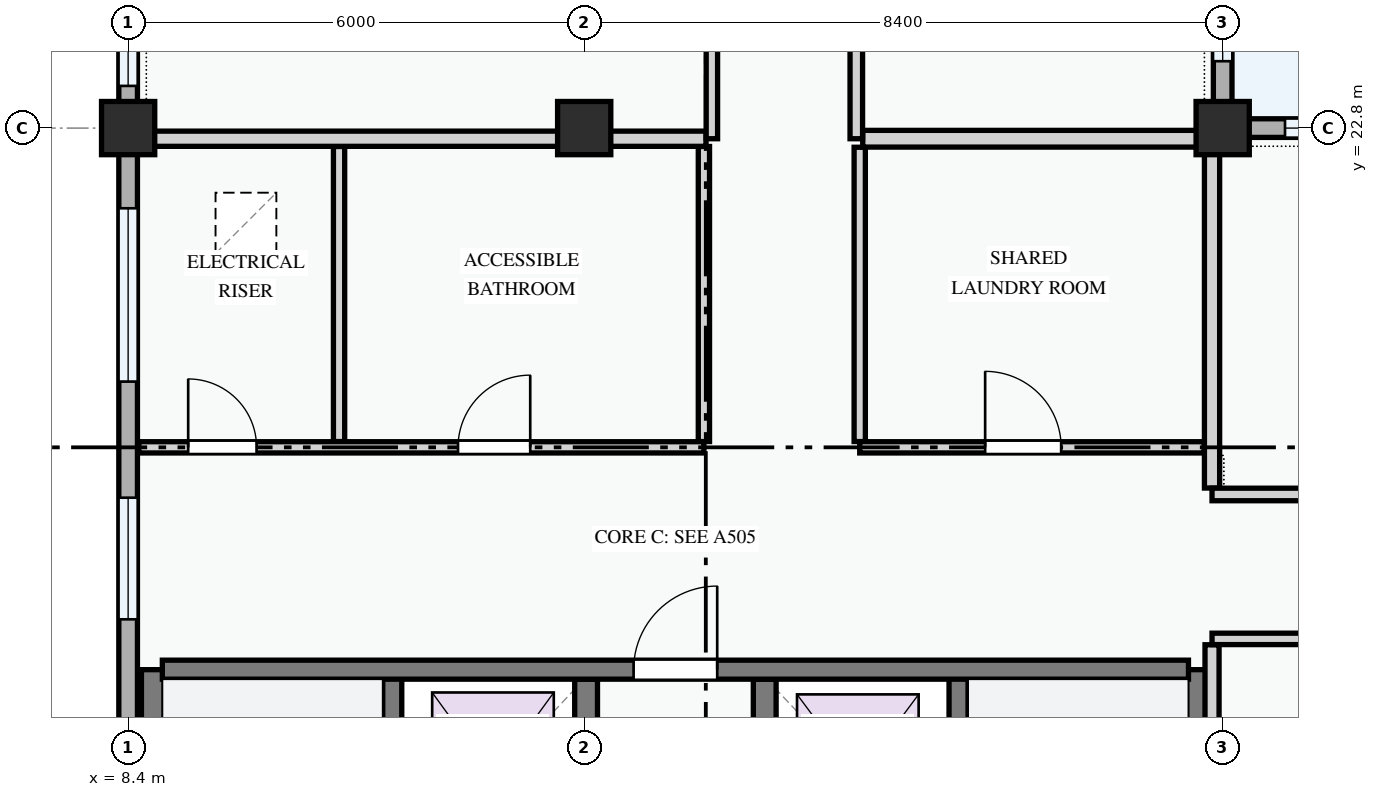
"""IFC4 building model, lengths in metres.
Left out: names, types, materials, properties, quantities, classifications, styles, units other than length and angle.
Written with IfcOpenShell. Run it as: python <this file> out.ifc"""

import sys

from ifc_helpers import new_model, si_unit, direction, frame, frame_2d, origin, origin_2d, place, context, subcontext, project, spatial, rectangle, extrude, element, fill, save


model = new_model("IFC4")
c1 = context("Model", 3, precision=1e-05, world=origin(), true_north=direction((0.0, 1.0)))
c2 = subcontext(c1, "Body", "Model", "MODEL_VIEW")
j1 = project(units=[si_unit("LENGTHUNIT", "METRE"), si_unit("PLANEANGLEUNIT", "RADIAN")], contexts=[c1])
p1 = place(None, origin())
s1 = spatial("IfcSite", under=j1, at=p1, CompositionType="ELEMENT")
p2 = place(p1, origin())
s2 = spatial("IfcBuilding", under=s1, at=p2, CompositionType="ELEMENT")
p3 = place(p2, origin())
s3 = spatial("IfcBuildingStorey", under=s2, at=p3, CompositionType="ELEMENT", Elevation=0.0)
for number, where, z_axis, x_axis in (
    (1, (8.4, 22.8, 0.0), (0.0, 0.0, 1.0), (1.0, 0.0, 0.0)),
    (2, (14.4, 22.8, 0.0), (0.0, 0.0, 1.0), (1.0, 0.0, 0.0)),
    (3, (22.8, 22.8, 0.0), (0.0, 0.0, 1.0), (1.0, 0.0, 0.0)),
):
    element("IfcColumn", number, at=place(p3, frame(where, z_axis=z_axis, x_axis=x_axis)), inside=s3, PredefinedType="COLUMN", context=c2, shape_type="SweptSolid", body=[
        extrude(rectangle(XDim=0.7, YDim=0.7, at=origin_2d()), origin(), (0.0, 0.0, 1.0), 4.5),
    ])
p4 = place(p3, frame((22.8, 22.8, 0.0), z_axis=(0.0, 0.0, 1.0), x_axis=(0.0, 1.0, 0.0)))
e4 = element("IfcWall", 4, at=p4, inside=s3, PredefinedType="STANDARD", context=c2, shape_type="SweptSolid", body=[
    extrude(rectangle(XDim=6.0, YDim=0.245, at=frame_2d((3.0, 0.0))), origin(), (0.0, 0.0, 1.0), 3.585),
])
p5 = place(p4, frame((0.88, 0.0, 0.78)))
e5 = element("IfcOpeningElement", 5, at=p5, cuts=e4, PredefinedType="OPENING", context=c2, shape_type="SweptSolid", body=[
    extrude(rectangle(XDim=1.5, YDim=1.5, at=frame_2d((0.75, 0.75))), frame((0.0, 0.133, 0.0), z_axis=(0.0, -1.0, 0.0), x_axis=(1.0, 0.0, 0.0)), (0.0, 0.0, 1.0), 0.265),
])
p6 = place(p4, frame((3.495, 0.0, 0.78)))
e6 = element("IfcOpeningElement", 6, at=p6, cuts=e4, PredefinedType="OPENING", context=c2, shape_type="SweptSolid", body=[
    extrude(rectangle(XDim=1.75, YDim=1.45, at=frame_2d((0.875, 0.725))), frame((0.0, 0.133, 0.0), z_axis=(0.0, -1.0, 0.0), x_axis=(1.0, 0.0, 0.0)), (0.0, 0.0, 1.0), 0.265),
])
p7 = place(p3, frame((8.4, 28.8, 0.0), z_axis=(0.0, 0.0, 1.0), x_axis=(0.0, -1.0, 0.0)))
e7 = element("IfcWall", 7, at=p7, inside=s3, PredefinedType="STANDARD", context=c2, shape_type="SweptSolid", body=[
    extrude(rectangle(XDim=6.0, YDim=0.245, at=frame_2d((3.0, 0.0))), origin(), (0.0, 0.0, 1.0), 3.585),
])
p8 = place(p7, frame((0.68, 0.0, 0.78)))
e8 = element("IfcOpeningElement", 8, at=p8, cuts=e7, PredefinedType="OPENING", context=c2, shape_type="SweptSolid", body=[
    extrude(rectangle(XDim=1.9, YDim=1.55, at=frame_2d((0.95, 0.775))), frame((0.0, 0.133, 0.0), z_axis=(0.0, -1.0, 0.0), x_axis=(1.0, 0.0, 0.0)), (0.0, 0.0, 1.0), 0.265),
])
p9 = place(p7, frame((3.295, 0.0, 0.78)))
e9 = element("IfcOpeningElement", 9, at=p9, cuts=e7, PredefinedType="OPENING", context=c2, shape_type="SweptSolid", body=[
    extrude(rectangle(XDim=2.15, YDim=1.65, at=frame_2d((1.075, 0.825))), frame((0.0, 0.133, 0.0), z_axis=(0.0, -1.0, 0.0), x_axis=(1.0, 0.0, 0.0)), (0.0, 0.0, 1.0), 0.265),
])
p10 = place(p3, frame((8.4, 22.8, 0.0), z_axis=(0.0, 0.0, 1.0), x_axis=(0.0, -1.0, 0.0)))
e10 = element("IfcWall", 10, at=p10, inside=s3, PredefinedType="STANDARD", context=c2, shape_type="SweptSolid", body=[
    extrude(rectangle(XDim=8.4, YDim=0.245, at=frame_2d((4.2, 0.0))), origin(), (0.0, 0.0, 1.0), 3.485),
])
p11 = place(p10, frame((1.055, 0.0, 0.78)))
e11 = element("IfcOpeningElement", 11, at=p11, cuts=e10, PredefinedType="OPENING", context=c2, shape_type="SweptSolid", body=[
    extrude(rectangle(XDim=2.28, YDim=1.46, at=frame_2d((1.14, 0.73))), frame((0.0, 0.133, 0.0), z_axis=(0.0, -1.0, 0.0), x_axis=(1.0, 0.0, 0.0)), (0.0, 0.0, 1.0), 0.265),
])
p12 = place(p10, frame((4.863, 0.0, 0.78)))
e12 = element("IfcOpeningElement", 12, at=p12, cuts=e10, PredefinedType="OPENING", context=c2, shape_type="SweptSolid", body=[
    extrude(rectangle(XDim=1.6, YDim=1.55, at=frame_2d((0.8, 0.775))), frame((0.0, 0.133, 0.0), z_axis=(0.0, -1.0, 0.0), x_axis=(1.0, 0.0, 0.0)), (0.0, 0.0, 1.0), 0.265),
])
p13 = place(p3, frame((28.8, 22.8, 0.0), z_axis=(0.0, 0.0, 1.0), x_axis=(-1.0, 0.0, 0.0)))
e13 = element("IfcWall", 13, at=p13, inside=s3, PredefinedType="STANDARD", context=c2, shape_type="SweptSolid", body=[
    extrude(rectangle(XDim=6.0, YDim=0.245, at=frame_2d((3.0, 0.0))), origin(), (0.0, 0.0, 1.0), 3.585),
])
p14 = place(p13, frame((1.005, 0.0, 0.78)))
e14 = element("IfcOpeningElement", 14, at=p14, cuts=e13, PredefinedType="OPENING", context=c2, shape_type="SweptSolid", body=[
    extrude(rectangle(XDim=1.25, YDim=1.45, at=frame_2d((0.625, 0.725))), frame((0.0, 0.133, 0.0), z_axis=(0.0, -1.0, 0.0), x_axis=(1.0, 0.0, 0.0)), (0.0, 0.0, 1.0), 0.265),
])
p15 = place(p13, frame((3.56, 0.0, 0.78)))
e15 = element("IfcOpeningElement", 15, at=p15, cuts=e13, PredefinedType="OPENING", context=c2, shape_type="SweptSolid", body=[
    extrude(rectangle(XDim=1.62, YDim=1.38, at=frame_2d((0.81, 0.69))), frame((0.0, 0.133, 0.0), z_axis=(0.0, -1.0, 0.0), x_axis=(1.0, 0.0, 0.0)), (0.0, 0.0, 1.0), 0.265),
])
p16 = place(p3, frame((11.875, 8.75, 0.0), z_axis=(0.0, 0.0, 1.0), x_axis=(0.0, 1.0, 0.0)))
e16 = element("IfcWall", 16, at=p16, inside=s3, PredefinedType="SHEAR", context=c2, shape_type="SweptSolid", body=[
    extrude(rectangle(XDim=6.925, YDim=0.25, at=frame_2d((3.462, 0.0))), origin(), (0.0, 0.0, 1.0), 4.2),
])
p17 = place(p16, frame((0.35, 0.0, 0.0)))
e17 = element("IfcOpeningElement", 17, at=p17, cuts=e16, PredefinedType="OPENING", context=c2, shape_type="SweptSolid", body=[
    extrude(rectangle(XDim=0.95, YDim=2.1, at=frame_2d((0.475, 1.05))), frame((0.0, 0.135, 0.0), z_axis=(0.0, -1.0, 0.0), x_axis=(1.0, 0.0, 0.0)), (0.0, 0.0, 1.0), 0.27),
])
p18 = place(p3, frame((8.725, 8.6, 0.0), z_axis=(0.0, 0.0, 1.0), x_axis=(0.0, 1.0, 0.0)))
e18 = element("IfcWall", 18, at=p18, inside=s3, PredefinedType="SHEAR", context=c2, shape_type="SweptSolid", body=[
    extrude(rectangle(XDim=7.075, YDim=0.3, at=frame_2d((3.538, 0.0))), origin(), (0.0, 0.0, 1.0), 4.2),
])
p19 = place(p3, frame((22.475, 8.75, 0.0), z_axis=(0.0, 0.0, 1.0), x_axis=(0.0, 1.0, 0.0)))
e19 = element("IfcWall", 19, at=p19, inside=s3, PredefinedType="SHEAR", context=c2, shape_type="SweptSolid", body=[
    extrude(rectangle(XDim=6.925, YDim=0.3, at=frame_2d((3.462, 0.0))), origin(), (0.0, 0.0, 1.0), 4.2),
])
p20 = place(p3, frame((19.325, 8.75, 0.0), z_axis=(0.0, 0.0, 1.0), x_axis=(0.0, 1.0, 0.0)))
e20 = element("IfcWall", 20, at=p20, inside=s3, PredefinedType="SHEAR", context=c2, shape_type="SweptSolid", body=[
    extrude(rectangle(XDim=6.925, YDim=0.25, at=frame_2d((3.462, 0.0))), origin(), (0.0, 0.0, 1.0), 4.2),
])
p21 = place(p20, frame((0.35, 0.0, 0.0)))
e21 = element("IfcOpeningElement", 21, at=p21, cuts=e20, PredefinedType="OPENING", context=c2, shape_type="SweptSolid", body=[
    extrude(rectangle(XDim=0.95, YDim=2.1, at=frame_2d((0.475, 1.05))), frame((0.0, 0.135, 0.0), z_axis=(0.0, -1.0, 0.0), x_axis=(1.0, 0.0, 0.0)), (0.0, 0.0, 1.0), 0.27),
])
for number, where, z_axis, x_axis in (
    (22, (14.425, 13.125, 0.0), (0.0, 0.0, 1.0), (0.0, 1.0, 0.0)),
    (23, (16.775, 13.125, 0.0), (0.0, 0.0, 1.0), (0.0, 1.0, 0.0)),
):
    element("IfcWall", number, at=place(p3, frame(where, z_axis=z_axis, x_axis=x_axis)), inside=s3, PredefinedType="SHEAR", context=c2, shape_type="SweptSolid", body=[
        extrude(rectangle(XDim=2.425, YDim=0.3, at=frame_2d((1.212, 0.0))), origin(), (0.0, 0.0, 1.0), 4.2),
    ])
p22 = place(p3, frame((8.85, 15.675, 0.0), z_axis=(0.0, 0.0, 1.0), x_axis=(1.0, 0.0, 0.0)))
e24 = element("IfcWall", 24, at=p22, inside=s3, PredefinedType="SHEAR", context=c2, shape_type="SweptSolid", body=[
    extrude(rectangle(XDim=13.5, YDim=0.25, at=frame_2d((6.75, 0.0))), origin(), (0.0, 0.0, 1.0), 4.2),
])
p23 = place(p22, frame((6.2, 0.0, 0.0)))
e25 = element("IfcOpeningElement", 25, at=p23, cuts=e24, PredefinedType="OPENING", context=c2, shape_type="SweptSolid", body=[
    extrude(rectangle(XDim=1.1, YDim=2.15, at=frame_2d((0.55, 1.075))), frame((0.0, 0.135, 0.0), z_axis=(0.0, -1.0, 0.0), x_axis=(1.0, 0.0, 0.0)), (0.0, 0.0, 1.0), 0.27),
])
for number, where, z_axis, x_axis in (
    (26, (11.175, 18.676, 0.0), (0.0, 0.0, 1.0), (0.0, 1.0, 0.0)),
    (27, (15.975, 18.676, 0.0), (0.0, 0.0, 1.0), (0.0, 1.0, 0.0)),
):
    element("IfcWall", number, at=place(p3, frame(where, z_axis=z_axis, x_axis=x_axis)), inside=s3, PredefinedType="PARTITIONING", context=c2, shape_type="SweptSolid", body=[
        extrude(rectangle(XDim=3.882, YDim=0.148, at=frame_2d((1.941, 0.0))), origin(), (0.0, 0.0, 1.0), 4.2),
    ])
p24 = place(p3, frame((18.025, 18.676, 0.0), z_axis=(0.0, 0.0, 1.0), x_axis=(0.0, 1.0, 0.0)))
e28 = element("IfcWall", 28, at=p24, inside=s3, PredefinedType="PARTITIONING", context=c2, shape_type="SweptSolid", body=[
    extrude(rectangle(XDim=3.872, YDim=0.148, at=frame_2d((1.936, 0.0))), origin(), (0.0, 0.0, 1.0), 4.2),
])
p25 = place(p3, frame((8.54, 18.6, 0.0), z_axis=(0.0, 0.0, 1.0), x_axis=(1.0, 0.0, 0.0)))
e29 = element("IfcWall", 29, at=p25, inside=s3, PredefinedType="PARTITIONING", context=c2, shape_type="SweptSolid", body=[
    extrude(rectangle(XDim=7.435, YDim=0.148, at=frame_2d((3.718, 0.0))), origin(), (0.0, 0.0, 1.0), 4.2),
])
p26 = place(p25, frame((0.65, 0.0, 0.0)))
e30 = element("IfcOpeningElement", 30, at=p26, cuts=e29, PredefinedType="OPENING", context=c2, shape_type="SweptSolid", body=[
    extrude(rectangle(XDim=0.9, YDim=2.1, at=frame_2d((0.45, 1.05))), frame((0.0, 0.084, 0.0), z_axis=(0.0, -1.0, 0.0), x_axis=(1.0, 0.0, 0.0)), (0.0, 0.0, 1.0), 0.168),
])
p27 = place(p25, frame((4.2, 0.0, 0.0)))
e31 = element("IfcOpeningElement", 31, at=p27, cuts=e29, PredefinedType="OPENING", context=c2, shape_type="SweptSolid", body=[
    extrude(rectangle(XDim=0.95, YDim=2.1, at=frame_2d((0.475, 1.05))), frame((0.0, 0.084, 0.0), z_axis=(0.0, -1.0, 0.0), x_axis=(1.0, 0.0, 0.0)), (0.0, 0.0, 1.0), 0.168),
])
p28 = place(p3, frame((18.025, 18.6, 0.0), z_axis=(0.0, 0.0, 1.0), x_axis=(1.0, 0.0, 0.0)))
e32 = element("IfcWall", 32, at=p28, inside=s3, PredefinedType="PARTITIONING", context=c2, shape_type="SweptSolid", body=[
    extrude(rectangle(XDim=4.533, YDim=0.148, at=frame_2d((2.267, 0.0))), origin(), (0.0, 0.0, 1.0), 4.2),
])
p29 = place(p28, frame((1.65, 0.0, 0.0)))
e33 = element("IfcOpeningElement", 33, at=p29, cuts=e32, PredefinedType="OPENING", context=c2, shape_type="SweptSolid", body=[
    extrude(rectangle(XDim=1.0, YDim=2.15, at=frame_2d((0.5, 1.075))), frame((0.0, 0.084, 0.0), z_axis=(0.0, -1.0, 0.0), x_axis=(1.0, 0.0, 0.0)), (0.0, 0.0, 1.0), 0.168),
])
p30 = place(p3, frame((8.524, 22.66, 0.0), z_axis=(0.0, 0.0, 1.0), x_axis=(1.0, 0.0, 0.0)))
e34 = element("IfcWall", 34, at=p30, inside=s3, PredefinedType="PARTITIONING", context=c2, shape_type="SweptSolid", body=[
    extrude(rectangle(XDim=7.479, YDim=0.2, at=frame_2d((3.739, 0.0))), origin(), (0.0, 0.0, 1.0), 3.485),
])
p31 = place(p3, frame((18.064, 22.66, 0.0), z_axis=(0.0, 0.0, 1.0), x_axis=(1.0, 0.0, 0.0)))
e35 = element("IfcWall", 35, at=p31, inside=s3, PredefinedType="PARTITIONING", context=c2, shape_type="SweptSolid", body=[
    extrude(rectangle(XDim=4.494, YDim=0.22, at=frame_2d((2.247, 0.0))), origin(), (0.0, 0.0, 1.0), 3.485),
])
p32 = place(p3, frame((16.08, 22.66, 0.0), z_axis=(0.0, 0.0, 1.0), x_axis=(0.0, 1.0, 0.0)))
e36 = element("IfcWall", 36, at=p32, inside=s3, PredefinedType="PARTITIONING", context=c2, shape_type="SweptSolid", body=[
    extrude(rectangle(XDim=34.816, YDim=0.15, at=frame_2d((17.408, 0.0))), origin(), (0.0, 0.0, 1.0), 4.2),
])
p33 = place(p32, frame((9.996, 0.0, 0.0)))
e37 = element("IfcOpeningElement", 37, at=p33, cuts=e36, PredefinedType="OPENING", context=c2, shape_type="SweptSolid", body=[
    extrude(rectangle(XDim=0.95, YDim=2.1, at=frame_2d((0.475, 1.05))), frame((0.0, 0.085, 0.0), z_axis=(0.0, -1.0, 0.0), x_axis=(1.0, 0.0, 0.0)), (0.0, 0.0, 1.0), 0.17),
])
p34 = place(p32, frame((16.965, 0.0, 0.0)))
e38 = element("IfcOpeningElement", 38, at=p34, cuts=e36, PredefinedType="OPENING", context=c2, shape_type="SweptSolid", body=[
    extrude(rectangle(XDim=0.95, YDim=2.1, at=frame_2d((0.475, 1.05))), frame((0.0, 0.085, 0.0), z_axis=(0.0, -1.0, 0.0), x_axis=(1.0, 0.0, 0.0)), (0.0, 0.0, 1.0), 0.17),
])
p35 = place(p32, frame((24.249, 0.0, 0.0)))
e39 = element("IfcOpeningElement", 39, at=p35, cuts=e36, PredefinedType="OPENING", context=c2, shape_type="SweptSolid", body=[
    extrude(rectangle(XDim=0.95, YDim=2.1, at=frame_2d((0.475, 1.05))), frame((0.0, 0.085, 0.0), z_axis=(0.0, -1.0, 0.0), x_axis=(1.0, 0.0, 0.0)), (0.0, 0.0, 1.0), 0.17),
])
p36 = place(p3, frame((17.98, 22.66, 0.0), z_axis=(0.0, 0.0, 1.0), x_axis=(0.0, 1.0, 0.0)))
e40 = element("IfcWall", 40, at=p36, inside=s3, PredefinedType="PARTITIONING", context=c2, shape_type="SweptSolid", body=[
    extrude(rectangle(XDim=34.816, YDim=0.165, at=frame_2d((17.408, 0.0))), origin(), (0.0, 0.0, 1.0), 4.2),
])
p37 = place(p36, frame((9.986, 0.0, 0.0)))
e41 = element("IfcOpeningElement", 41, at=p37, cuts=e40, PredefinedType="OPENING", context=c2, shape_type="SweptSolid", body=[
    extrude(rectangle(XDim=0.92, YDim=2.1, at=frame_2d((0.46, 1.05))), frame((0.0, 0.093, 0.0), z_axis=(0.0, -1.0, 0.0), x_axis=(1.0, 0.0, 0.0)), (0.0, 0.0, 1.0), 0.185),
])
p38 = place(p36, frame((16.96, 0.0, 0.0)))
e42 = element("IfcOpeningElement", 42, at=p38, cuts=e40, PredefinedType="OPENING", context=c2, shape_type="SweptSolid", body=[
    extrude(rectangle(XDim=0.92, YDim=2.1, at=frame_2d((0.46, 1.05))), frame((0.0, 0.093, 0.0), z_axis=(0.0, -1.0, 0.0), x_axis=(1.0, 0.0, 0.0)), (0.0, 0.0, 1.0), 0.185),
])
p39 = place(p36, frame((24.248, 0.0, 0.0)))
e43 = element("IfcOpeningElement", 43, at=p39, cuts=e40, PredefinedType="OPENING", context=c2, shape_type="SweptSolid", body=[
    extrude(rectangle(XDim=0.92, YDim=2.1, at=frame_2d((0.46, 1.05))), frame((0.0, 0.093, 0.0), z_axis=(0.0, -1.0, 0.0), x_axis=(1.0, 0.0, 0.0)), (0.0, 0.0, 1.0), 0.185),
])
p40 = place(p3, frame((22.66, 8.524, 0.0), z_axis=(0.0, 0.0, 1.0), x_axis=(0.0, 1.0, 0.0)))
e44 = element("IfcWall", 44, at=p40, inside=s3, PredefinedType="PARTITIONING", context=c2, shape_type="SweptSolid", body=[
    extrude(rectangle(XDim=7.479, YDim=0.185, at=frame_2d((3.739, 0.0))), origin(), (0.0, 0.0, 1.0), 3.485),
])
p41 = place(p3, frame((22.66, 18.064, 0.0), z_axis=(0.0, 0.0, 1.0), x_axis=(0.0, 1.0, 0.0)))
e45 = element("IfcWall", 45, at=p41, inside=s3, PredefinedType="PARTITIONING", context=c2, shape_type="SweptSolid", body=[
    extrude(rectangle(XDim=4.676, YDim=0.2, at=frame_2d((2.338, 0.0))), origin(), (0.0, 0.0, 1.0), 3.485),
])
p42 = place(p3, frame((22.66, 16.08, 0.0), z_axis=(0.0, 0.0, 1.0), x_axis=(1.0, 0.0, 0.0)))
e46 = element("IfcWall", 46, at=p42, inside=s3, PredefinedType="PARTITIONING", context=c2, shape_type="SweptSolid", body=[
    extrude(rectangle(XDim=34.816, YDim=0.15, at=frame_2d((17.408, 0.0))), origin(), (0.0, 0.0, 1.0), 4.2),
])
p43 = place(p42, frame((9.996, 0.0, 0.0)))
e47 = element("IfcOpeningElement", 47, at=p43, cuts=e46, PredefinedType="OPENING", context=c2, shape_type="SweptSolid", body=[
    extrude(rectangle(XDim=0.95, YDim=2.1, at=frame_2d((0.475, 1.05))), frame((0.0, 0.085, 0.0), z_axis=(0.0, -1.0, 0.0), x_axis=(1.0, 0.0, 0.0)), (0.0, 0.0, 1.0), 0.17),
])
p44 = place(p42, frame((16.965, 0.0, 0.0)))
e48 = element("IfcOpeningElement", 48, at=p44, cuts=e46, PredefinedType="OPENING", context=c2, shape_type="SweptSolid", body=[
    extrude(rectangle(XDim=0.95, YDim=2.1, at=frame_2d((0.475, 1.05))), frame((0.0, 0.085, 0.0), z_axis=(0.0, -1.0, 0.0), x_axis=(1.0, 0.0, 0.0)), (0.0, 0.0, 1.0), 0.17),
])
p45 = place(p42, frame((24.249, 0.0, 0.0)))
e49 = element("IfcOpeningElement", 49, at=p45, cuts=e46, PredefinedType="OPENING", context=c2, shape_type="SweptSolid", body=[
    extrude(rectangle(XDim=0.95, YDim=2.1, at=frame_2d((0.475, 1.05))), frame((0.0, 0.085, 0.0), z_axis=(0.0, -1.0, 0.0), x_axis=(1.0, 0.0, 0.0)), (0.0, 0.0, 1.0), 0.17),
])
p46 = place(p3, frame((22.66, 17.98, 0.0), z_axis=(0.0, 0.0, 1.0), x_axis=(1.0, 0.0, 0.0)))
e50 = element("IfcWall", 50, at=p46, inside=s3, PredefinedType="PARTITIONING", context=c2, shape_type="SweptSolid", body=[
    extrude(rectangle(XDim=34.816, YDim=0.165, at=frame_2d((17.408, 0.0))), origin(), (0.0, 0.0, 1.0), 4.2),
])
p47 = place(p46, frame((9.986, 0.0, 0.0)))
e51 = element("IfcOpeningElement", 51, at=p47, cuts=e50, PredefinedType="OPENING", context=c2, shape_type="SweptSolid", body=[
    extrude(rectangle(XDim=0.92, YDim=2.1, at=frame_2d((0.46, 1.05))), frame((0.0, 0.093, 0.0), z_axis=(0.0, -1.0, 0.0), x_axis=(1.0, 0.0, 0.0)), (0.0, 0.0, 1.0), 0.185),
])
p48 = place(p46, frame((16.96, 0.0, 0.0)))
e52 = element("IfcOpeningElement", 52, at=p48, cuts=e50, PredefinedType="OPENING", context=c2, shape_type="SweptSolid", body=[
    extrude(rectangle(XDim=0.92, YDim=2.1, at=frame_2d((0.46, 1.05))), frame((0.0, 0.093, 0.0), z_axis=(0.0, -1.0, 0.0), x_axis=(1.0, 0.0, 0.0)), (0.0, 0.0, 1.0), 0.185),
])
p49 = place(p46, frame((24.248, 0.0, 0.0)))
e53 = element("IfcOpeningElement", 53, at=p49, cuts=e50, PredefinedType="OPENING", context=c2, shape_type="SweptSolid", body=[
    extrude(rectangle(XDim=0.96, YDim=2.12, at=frame_2d((0.48, 1.06))), frame((0.0, 0.093, 0.0), z_axis=(0.0, -1.0, 0.0), x_axis=(1.0, 0.0, 0.0)), (0.0, 0.0, 1.0), 0.185),
])
p50 = place(p5, origin())
e54 = element("IfcWindow", 54, at=p50, inside=s3, PartitioningType="SINGLE_PANEL", PredefinedType="WINDOW", context=c2, shape_type="SweptSolid", body=[
    extrude(rectangle(XDim=1.5, YDim=1.5, at=frame_2d((0.75, 0.75))), frame((0.0, 0.03, 0.0), z_axis=(0.0, -1.0, 0.0), x_axis=(1.0, 0.0, 0.0)), (0.0, 0.0, 1.0), 0.06),
])
fill(e5, e54)
p51 = place(p9, origin())
e55 = element("IfcWindow", 55, at=p51, inside=s3, PartitioningType="DOUBLE_PANEL_VERTICAL", PredefinedType="WINDOW", context=c2, shape_type="SweptSolid", body=[
    extrude(rectangle(XDim=2.15, YDim=1.65, at=frame_2d((1.075, 0.825))), frame((0.0, 0.03, 0.0), z_axis=(0.0, -1.0, 0.0), x_axis=(1.0, 0.0, 0.0)), (0.0, 0.0, 1.0), 0.06),
])
fill(e9, e55)
p52 = place(p11, origin())
e56 = element("IfcWindow", 56, at=p52, inside=s3, PartitioningType="DOUBLE_PANEL_VERTICAL", PredefinedType="WINDOW", context=c2, shape_type="SweptSolid", body=[
    extrude(rectangle(XDim=2.28, YDim=1.46, at=frame_2d((1.14, 0.73))), frame((0.0, 0.03, 0.0), z_axis=(0.0, -1.0, 0.0), x_axis=(1.0, 0.0, 0.0)), (0.0, 0.0, 1.0), 0.06),
])
fill(e11, e56)
p53 = place(p12, origin())
e57 = element("IfcWindow", 57, at=p53, inside=s3, PartitioningType="DOUBLE_PANEL_VERTICAL", PredefinedType="WINDOW", context=c2, shape_type="SweptSolid", body=[
    extrude(rectangle(XDim=1.6, YDim=1.55, at=frame_2d((0.8, 0.775))), frame((0.0, 0.03, 0.0), z_axis=(0.0, -1.0, 0.0), x_axis=(1.0, 0.0, 0.0)), (0.0, 0.0, 1.0), 0.06),
])
fill(e12, e57)
p54 = place(p15, origin())
e58 = element("IfcWindow", 58, at=p54, inside=s3, PartitioningType="DOUBLE_PANEL_VERTICAL", PredefinedType="WINDOW", context=c2, shape_type="SweptSolid", body=[
    extrude(rectangle(XDim=1.62, YDim=1.38, at=frame_2d((0.81, 0.69))), frame((0.0, 0.03, 0.0), z_axis=(0.0, -1.0, 0.0), x_axis=(1.0, 0.0, 0.0)), (0.0, 0.0, 1.0), 0.06),
])
fill(e15, e58)
p55 = place(p23, origin())
e59 = element("IfcDoor", 59, at=p55, inside=s3, OperationType="SINGLE_SWING_RIGHT", PredefinedType="DOOR", context=c2, shape_type="SweptSolid", body=[
    extrude(rectangle(XDim=1.1, YDim=2.15, at=frame_2d((0.55, 1.075))), frame((0.0, 0.025, 0.0), z_axis=(0.0, -1.0, 0.0), x_axis=(1.0, 0.0, 0.0)), (0.0, 0.0, 1.0), 0.05),
])
fill(e25, e59)
p56 = place(p26, origin())
e60 = element("IfcDoor", 60, at=p56, inside=s3, OperationType="SINGLE_SWING_LEFT", PredefinedType="DOOR", context=c2, shape_type="SweptSolid", body=[
    extrude(rectangle(XDim=0.9, YDim=2.1, at=frame_2d((0.45, 1.05))), frame((0.0, 0.025, 0.0), z_axis=(0.0, -1.0, 0.0), x_axis=(1.0, 0.0, 0.0)), (0.0, 0.0, 1.0), 0.05),
])
fill(e30, e60)
p57 = place(p27, origin())
e61 = element("IfcDoor", 61, at=p57, inside=s3, OperationType="SINGLE_SWING_RIGHT", PredefinedType="DOOR", context=c2, shape_type="SweptSolid", body=[
    extrude(rectangle(XDim=0.95, YDim=2.1, at=frame_2d((0.475, 1.05))), frame((0.0, 0.025, 0.0), z_axis=(0.0, -1.0, 0.0), x_axis=(1.0, 0.0, 0.0)), (0.0, 0.0, 1.0), 0.05),
])
fill(e31, e61)
p58 = place(p29, origin())
e62 = element("IfcDoor", 62, at=p58, inside=s3, OperationType="SINGLE_SWING_LEFT", PredefinedType="DOOR", context=c2, shape_type="SweptSolid", body=[
    extrude(rectangle(XDim=1.0, YDim=2.15, at=frame_2d((0.5, 1.075))), frame((0.0, 0.025, 0.0), z_axis=(0.0, -1.0, 0.0), x_axis=(1.0, 0.0, 0.0)), (0.0, 0.0, 1.0), 0.05),
])
fill(e33, e62)
save(model, sys.argv[1])
